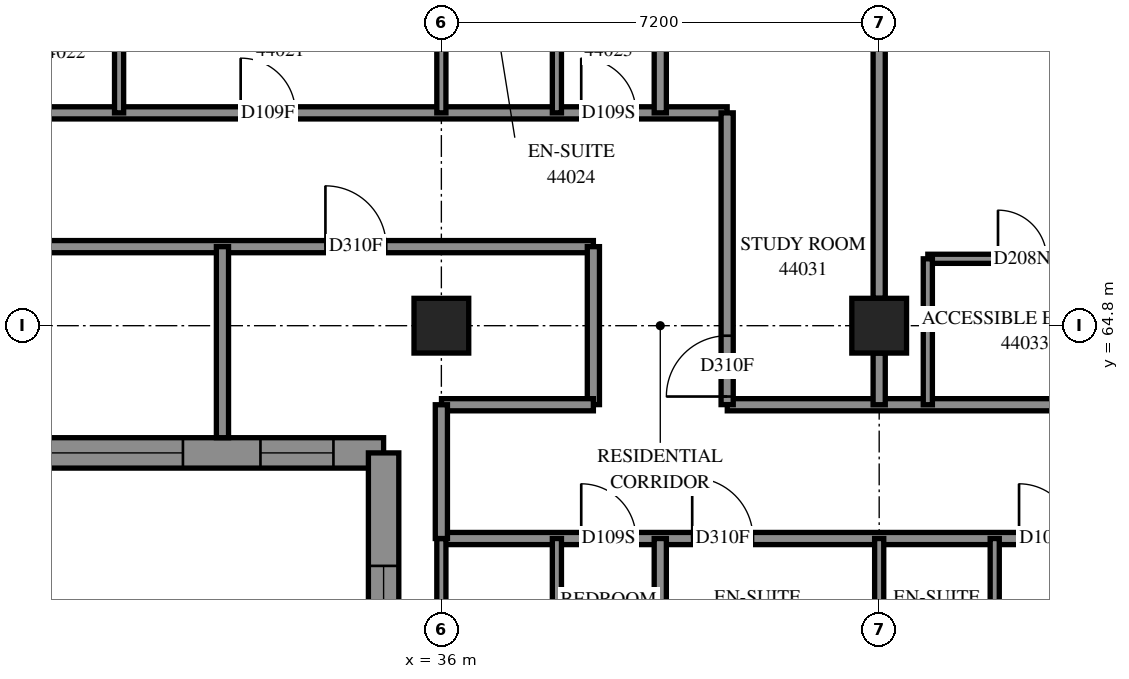
"""IFC4 building model, lengths in metres.
Left out: names, types, materials, properties, quantities, classifications, styles, units other than length and angle.
Written with IfcOpenShell. Run it as: python <this file> out.ifc"""

import sys

from ifc_helpers import new_model, si_unit, direction, frame, frame_2d, origin, origin_2d, place, context, subcontext, project, spatial, polyline, rectangle, outline, extrude, element, fill, save


model = new_model("IFC4")
c1 = context("Model", 3, precision=1e-05, world=origin(), true_north=direction((0.0, 1.0)))
c2 = subcontext(c1, "Body", "Model", "MODEL_VIEW")
j1 = project(units=[si_unit("LENGTHUNIT", "METRE"), si_unit("PLANEANGLEUNIT", "RADIAN")], contexts=[c1])
p1 = place(None, origin())
s1 = spatial("IfcSite", under=j1, at=p1, CompositionType="ELEMENT")
p2 = place(p1, origin())
s2 = spatial("IfcBuilding", under=s1, at=p2, CompositionType="ELEMENT")
p3 = place(p2, frame((0.0, 0.0, 162.6)))
s3 = spatial("IfcBuildingStorey", under=s2, at=p3, CompositionType="ELEMENT", Elevation=162.6)
for number, where, z_axis, x_axis in (
    (1, (36.0, 64.8, 0.0), (0.0, 0.0, 1.0), (1.0, 0.0, 0.0)),
    (2, (43.2, 64.8, 0.0), (0.0, 0.0, 1.0), (1.0, 0.0, 0.0)),
):
    element("IfcColumn", number, at=place(p3, frame(where, z_axis=z_axis, x_axis=x_axis)), inside=s3, PredefinedType="COLUMN", context=c2, shape_type="SweptSolid", body=[
        extrude(rectangle(XDim=0.9, YDim=0.9, at=origin_2d()), origin(), (0.0, 0.0, 1.0), 3.1),
    ])
p4 = place(p3, frame((19.508, 62.708, 0.0), z_axis=(0.0, 0.0, 1.0), x_axis=(1.0, 0.0, 0.0)))
e3 = element("IfcWall", 3, at=p4, inside=s3, PredefinedType="SOLIDWALL", context=c2, shape_type="SweptSolid", body=[
    extrude(outline(polyline([(-0.25, -0.25), (15.292, -0.25), (15.792, 0.25), (0.25, 0.25), (-0.25, -0.25)])), origin(), (0.0, 0.0, 1.0), 3.1),
])
p5 = place(p4, frame((2.492, 0.0, 0.45)))
e4 = element("IfcOpeningElement", 4, at=p5, cuts=e3, PredefinedType="OPENING", context=c2, shape_type="SweptSolid", body=[
    extrude(rectangle(XDim=2.8, YDim=2.5, at=frame_2d((1.4, 1.25))), frame((0.0, 0.26, 0.0), z_axis=(0.0, -1.0, 0.0), x_axis=(1.0, 0.0, 0.0)), (0.0, 0.0, 1.0), 0.52),
])
p6 = place(p4, frame((6.092, 0.0, 0.45)))
e5 = element("IfcOpeningElement", 5, at=p6, cuts=e3, PredefinedType="OPENING", context=c2, shape_type="SweptSolid", body=[
    extrude(rectangle(XDim=2.8, YDim=2.5, at=frame_2d((1.4, 1.25))), frame((0.0, 0.26, 0.0), z_axis=(0.0, -1.0, 0.0), x_axis=(1.0, 0.0, 0.0)), (0.0, 0.0, 1.0), 0.52),
])
p7 = place(p4, frame((9.442, 0.0, 0.45)))
e6 = element("IfcOpeningElement", 6, at=p7, cuts=e3, PredefinedType="OPENING", context=c2, shape_type="SweptSolid", body=[
    extrude(rectangle(XDim=2.8, YDim=2.5, at=frame_2d((1.4, 1.25))), frame((0.0, 0.26, 0.0), z_axis=(0.0, -1.0, 0.0), x_axis=(1.0, 0.0, 0.0)), (0.0, 0.0, 1.0), 0.52),
])
p8 = place(p4, frame((0.671, 0.0, 0.45)))
e7 = element("IfcOpeningElement", 7, at=p8, cuts=e3, PredefinedType="OPENING", context=c2, shape_type="SweptSolid", body=[
    extrude(rectangle(XDim=1.2, YDim=2.5, at=frame_2d((0.6, 1.25))), frame((0.0, 0.26, 0.0), z_axis=(0.0, -1.0, 0.0), x_axis=(1.0, 0.0, 0.0)), (0.0, 0.0, 1.0), 0.52),
])
p9 = place(p4, frame((13.517, 0.0, 0.45)))
e8 = element("IfcOpeningElement", 8, at=p9, cuts=e3, PredefinedType="OPENING", context=c2, shape_type="SweptSolid", body=[
    extrude(rectangle(XDim=1.2, YDim=2.5, at=frame_2d((0.6, 1.25))), frame((0.0, 0.26, 0.0), z_axis=(0.0, -1.0, 0.0), x_axis=(1.0, 0.0, 0.0)), (0.0, 0.0, 1.0), 0.52),
])
p10 = place(p3, frame((35.05, 62.708, 0.0), z_axis=(0.0, 0.0, 1.0), x_axis=(0.0, -1.0, 0.0)))
e9 = element("IfcWall", 9, at=p10, inside=s3, PredefinedType="SOLIDWALL", context=c2, shape_type="SweptSolid", body=[
    extrude(outline(polyline([(0.25, -0.25), (6.308, -0.25), (5.808, 0.25), (-0.25, 0.25), (0.25, -0.25)])), origin(), (0.0, 0.0, 1.0), 3.1),
])
p11 = place(p10, frame((1.858, 0.0, 0.7)))
e10 = element("IfcOpeningElement", 10, at=p11, cuts=e9, PredefinedType="OPENING", context=c2, shape_type="SweptSolid", body=[
    extrude(rectangle(XDim=1.8, YDim=2.2, at=frame_2d((0.9, 1.1))), frame((0.0, 0.26, 0.0), z_axis=(0.0, -1.0, 0.0), x_axis=(1.0, 0.0, 0.0)), (0.0, 0.0, 1.0), 0.52),
])
p12 = place(p10, frame((3.908, 0.0, 0.45)))
e11 = element("IfcOpeningElement", 11, at=p12, cuts=e9, PredefinedType="OPENING", context=c2, shape_type="SweptSolid", body=[
    extrude(rectangle(XDim=0.8, YDim=2.5, at=frame_2d((0.4, 1.25))), frame((0.0, 0.26, 0.0), z_axis=(0.0, -1.0, 0.0), x_axis=(1.0, 0.0, 0.0)), (0.0, 0.0, 1.0), 0.52),
])
p13 = place(p3, frame((21.6, 68.3, 0.0), z_axis=(0.0, 0.0, 1.0), x_axis=(1.0, 0.0, 0.0)))
e12 = element("IfcWall", 12, at=p13, inside=s3, PredefinedType="PARTITIONING", context=c2, shape_type="SweptSolid", body=[
    extrude(rectangle(XDim=19.1, YDim=0.2, at=frame_2d((9.55, 0.0))), origin(), (0.0, 0.0, 1.0), 3.1),
])
p14 = place(p13, frame((3.899, 0.0, 0.0)))
e13 = element("IfcOpeningElement", 13, at=p14, cuts=e12, PredefinedType="OPENING", context=c2, shape_type="SweptSolid", body=[
    extrude(rectangle(XDim=0.9, YDim=2.1, at=frame_2d((0.45, 1.05))), frame((0.0, 0.11, 0.0), z_axis=(0.0, -1.0, 0.0), x_axis=(1.0, 0.0, 0.0)), (0.0, 0.0, 1.0), 0.22),
])
p15 = place(p13, frame((11.099, 0.0, 0.0)))
e14 = element("IfcOpeningElement", 14, at=p15, cuts=e12, PredefinedType="OPENING", context=c2, shape_type="SweptSolid", body=[
    extrude(rectangle(XDim=0.9, YDim=2.1, at=frame_2d((0.45, 1.05))), frame((0.0, 0.11, 0.0), z_axis=(0.0, -1.0, 0.0), x_axis=(1.0, 0.0, 0.0)), (0.0, 0.0, 1.0), 0.22),
])
p16 = place(p13, frame((16.7, 0.0, 0.0)))
e15 = element("IfcOpeningElement", 15, at=p16, cuts=e12, PredefinedType="OPENING", context=c2, shape_type="SweptSolid", body=[
    extrude(rectangle(XDim=0.9, YDim=2.1, at=frame_2d((0.45, 1.05))), frame((0.0, 0.11, 0.0), z_axis=(0.0, -1.0, 0.0), x_axis=(1.0, 0.0, 0.0)), (0.0, 0.0, 1.0), 0.22),
])
p17 = place(p3, frame((21.6, 66.1, 0.0), z_axis=(0.0, 0.0, 1.0), x_axis=(1.0, 0.0, 0.0)))
e16 = element("IfcWall", 16, at=p17, inside=s3, PredefinedType="PARTITIONING", context=c2, shape_type="SweptSolid", body=[
    extrude(rectangle(XDim=16.9, YDim=0.2, at=frame_2d((8.45, 0.0))), origin(), (0.0, 0.0, 1.0), 3.1),
])
p18 = place(p17, frame((12.493, 0.0, 0.0)))
e17 = element("IfcOpeningElement", 17, at=p18, cuts=e16, PredefinedType="OPENING", context=c2, shape_type="SweptSolid", body=[
    extrude(rectangle(XDim=1.0, YDim=2.1, at=frame_2d((0.5, 1.05))), frame((0.0, 0.11, 0.0), z_axis=(0.0, -1.0, 0.0), x_axis=(1.0, 0.0, 0.0)), (0.0, 0.0, 1.0), 0.22),
])
p19 = place(p3, frame((36.0, 61.3, 0.0), z_axis=(0.0, 0.0, 1.0), x_axis=(1.0, 0.0, 0.0)))
e18 = element("IfcWall", 18, at=p19, inside=s3, PredefinedType="PARTITIONING", context=c2, shape_type="SweptSolid", body=[
    extrude(rectangle(XDim=16.9, YDim=0.2, at=frame_2d((8.45, 0.0))), origin(), (0.0, 0.0, 1.0), 3.1),
])
p20 = place(p19, frame((2.3, 0.0, 0.0)))
e19 = element("IfcOpeningElement", 19, at=p20, cuts=e18, PredefinedType="OPENING", context=c2, shape_type="SweptSolid", body=[
    extrude(rectangle(XDim=0.9, YDim=2.1, at=frame_2d((0.45, 1.05))), frame((0.0, 0.11, 0.0), z_axis=(0.0, -1.0, 0.0), x_axis=(1.0, 0.0, 0.0)), (0.0, 0.0, 1.0), 0.22),
])
p21 = place(p19, frame((4.125, 0.0, 0.0)))
e20 = element("IfcOpeningElement", 20, at=p21, cuts=e18, PredefinedType="OPENING", context=c2, shape_type="SweptSolid", body=[
    extrude(rectangle(XDim=1.0, YDim=2.1, at=frame_2d((0.5, 1.05))), frame((0.0, 0.11, 0.0), z_axis=(0.0, -1.0, 0.0), x_axis=(1.0, 0.0, 0.0)), (0.0, 0.0, 1.0), 0.22),
])
p22 = place(p19, frame((9.5, 0.0, 0.0)))
e21 = element("IfcOpeningElement", 21, at=p22, cuts=e18, PredefinedType="OPENING", context=c2, shape_type="SweptSolid", body=[
    extrude(rectangle(XDim=0.9, YDim=2.1, at=frame_2d((0.45, 1.05))), frame((0.0, 0.11, 0.0), z_axis=(0.0, -1.0, 0.0), x_axis=(1.0, 0.0, 0.0)), (0.0, 0.0, 1.0), 0.22),
])
p23 = place(p19, frame((11.325, 0.0, 0.0)))
e22 = element("IfcOpeningElement", 22, at=p23, cuts=e18, PredefinedType="OPENING", context=c2, shape_type="SweptSolid", body=[
    extrude(rectangle(XDim=1.0, YDim=2.1, at=frame_2d((0.5, 1.05))), frame((0.0, 0.11, 0.0), z_axis=(0.0, -1.0, 0.0), x_axis=(1.0, 0.0, 0.0)), (0.0, 0.0, 1.0), 0.22),
])
p24 = place(p19, frame((15.647, 0.0, 0.0)))
e23 = element("IfcOpeningElement", 23, at=p24, cuts=e18, PredefinedType="OPENING", context=c2, shape_type="SweptSolid", body=[
    extrude(rectangle(XDim=1.0, YDim=2.1, at=frame_2d((0.5, 1.05))), frame((0.0, 0.11, 0.0), z_axis=(0.0, -1.0, 0.0), x_axis=(1.0, 0.0, 0.0)), (0.0, 0.0, 1.0), 0.22),
])
p25 = place(p3, frame((40.702, 63.5, 0.0), z_axis=(0.0, 0.0, 1.0), x_axis=(1.0, 0.0, 0.0)))
e24 = element("IfcWall", 24, at=p25, inside=s3, PredefinedType="PARTITIONING", context=c2, shape_type="SweptSolid", body=[
    extrude(rectangle(XDim=14.198, YDim=0.2, at=frame_2d((7.099, 0.0))), origin(), (0.0, 0.0, 1.0), 3.1),
])
p26 = place(p25, frame((6.692, 0.0, 0.0)))
e25 = element("IfcOpeningElement", 25, at=p26, cuts=e24, PredefinedType="OPENING", context=c2, shape_type="SweptSolid", body=[
    extrude(rectangle(XDim=0.9, YDim=2.1, at=frame_2d((0.45, 1.05))), frame((0.0, 0.11, 0.0), z_axis=(0.0, -1.0, 0.0), x_axis=(1.0, 0.0, 0.0)), (0.0, 0.0, 1.0), 0.22),
])
p27 = place(p25, frame((10.25, 0.0, 0.0)))
e26 = element("IfcOpeningElement", 26, at=p27, cuts=e24, PredefinedType="OPENING", context=c2, shape_type="SweptSolid", body=[
    extrude(rectangle(XDim=0.9, YDim=2.1, at=frame_2d((0.45, 1.05))), frame((0.0, 0.11, 0.0), z_axis=(0.0, -1.0, 0.0), x_axis=(1.0, 0.0, 0.0)), (0.0, 0.0, 1.0), 0.22),
])
p28 = place(p3, frame((43.2, 65.25, 0.0), z_axis=(0.0, 0.0, 1.0), x_axis=(0.0, 1.0, 0.0)))
e27 = element("IfcWall", 27, at=p28, inside=s3, PredefinedType="PARTITIONING", context=c2, shape_type="SweptSolid", body=[
    extrude(rectangle(XDim=6.3, YDim=0.2, at=frame_2d((3.15, 0.0))), origin(), (0.0, 0.0, 1.0), 3.1),
])
p29 = place(p3, frame((40.7, 63.502, 0.0), z_axis=(0.0, 0.0, 1.0), x_axis=(0.0, 1.0, 0.0)))
e28 = element("IfcWall", 28, at=p29, inside=s3, PredefinedType="PARTITIONING", context=c2, shape_type="SweptSolid", body=[
    extrude(rectangle(XDim=4.798, YDim=0.2, at=frame_2d((2.399, 0.0))), origin(), (0.0, 0.0, 1.0), 3.1),
])
p30 = place(p29, frame((0.133, 0.0, 0.0)))
e29 = element("IfcOpeningElement", 29, at=p30, cuts=e28, PredefinedType="OPENING", context=c2, shape_type="SweptSolid", body=[
    extrude(rectangle(XDim=1.0, YDim=2.1, at=frame_2d((0.5, 1.05))), frame((0.0, 0.11, 0.0), z_axis=(0.0, -1.0, 0.0), x_axis=(1.0, 0.0, 0.0)), (0.0, 0.0, 1.0), 0.22),
])
p31 = place(p3, frame((39.6, 68.3, 0.0), z_axis=(0.0, 0.0, 1.0), x_axis=(0.0, 1.0, 0.0)))
e30 = element("IfcWall", 30, at=p31, inside=s3, PredefinedType="PARTITIONING", context=c2, shape_type="SweptSolid", body=[
    extrude(rectangle(XDim=4.581, YDim=0.2, at=frame_2d((2.291, 0.0))), origin(), (0.0, 0.0, 1.0), 3.1),
])
p32 = place(p3, frame((39.6, 56.9, 0.0), z_axis=(0.0, 0.0, 1.0), x_axis=(0.0, 1.0, 0.0)))
e31 = element("IfcWall", 31, at=p32, inside=s3, PredefinedType="PARTITIONING", context=c2, shape_type="SweptSolid", body=[
    extrude(rectangle(XDim=4.4, YDim=0.2, at=frame_2d((2.2, 0.0))), origin(), (0.0, 0.0, 1.0), 3.1),
])
p33 = place(p3, frame((44.0, 65.9, 0.0), z_axis=(0.0, 0.0, 1.0), x_axis=(1.0, 0.0, 0.0)))
e32 = element("IfcWall", 32, at=p33, inside=s3, PredefinedType="PARTITIONING", context=c2, shape_type="SweptSolid", body=[
    extrude(rectangle(XDim=3.2, YDim=0.15, at=frame_2d((1.6, 0.0))), origin(), (0.0, 0.0, 1.0), 3.1),
])
p34 = place(p33, frame((1.154, 0.0, 0.0)))
e33 = element("IfcOpeningElement", 33, at=p34, cuts=e32, PredefinedType="OPENING", context=c2, shape_type="SweptSolid", body=[
    extrude(rectangle(XDim=0.8, YDim=2.1, at=frame_2d((0.4, 1.05))), frame((0.0, 0.085, 0.0), z_axis=(0.0, -1.0, 0.0), x_axis=(1.0, 0.0, 0.0)), (0.0, 0.0, 1.0), 0.17),
])
p35 = place(p3, frame((32.4, 62.958, 0.0), z_axis=(0.0, 0.0, 1.0), x_axis=(0.0, 1.0, 0.0)))
e34 = element("IfcWall", 34, at=p35, inside=s3, PredefinedType="PARTITIONING", context=c2, shape_type="SweptSolid", body=[
    extrude(rectangle(XDim=3.142, YDim=0.2, at=frame_2d((1.571, 0.0))), origin(), (0.0, 0.0, 1.0), 3.1),
])
p36 = place(p3, frame((38.5, 63.502, 0.0), z_axis=(0.0, 0.0, 1.0), x_axis=(0.0, 1.0, 0.0)))
e35 = element("IfcWall", 35, at=p36, inside=s3, PredefinedType="PARTITIONING", context=c2, shape_type="SweptSolid", body=[
    extrude(rectangle(XDim=2.598, YDim=0.2, at=frame_2d((1.299, 0.0))), origin(), (0.0, 0.0, 1.0), 3.1),
])
p37 = place(p3, frame((36.002, 63.5, 0.0), z_axis=(0.0, 0.0, 1.0), x_axis=(1.0, 0.0, 0.0)))
e36 = element("IfcWall", 36, at=p37, inside=s3, PredefinedType="PARTITIONING", context=c2, shape_type="SweptSolid", body=[
    extrude(rectangle(XDim=2.498, YDim=0.2, at=frame_2d((1.249, 0.0))), origin(), (0.0, 0.0, 1.0), 3.1),
])
for number, where, z_axis, x_axis in (
    (37, (30.7, 68.3, 0.0), (0.0, 0.0, 1.0), (0.0, 1.0, 0.0)),
    (38, (37.9, 68.3, 0.0), (0.0, 0.0, 1.0), (0.0, 1.0, 0.0)),
    (39, (36.0, 68.3, 0.0), (0.0, 0.0, 1.0), (0.0, 1.0, 0.0)),
    (40, (44.0, 63.5, 0.0), (0.0, 0.0, 1.0), (0.0, 1.0, 0.0)),
    (41, (37.9, 58.9, 0.0), (0.0, 0.0, 1.0), (0.0, 1.0, 0.0)),
):
    element("IfcWall", number, at=place(p3, frame(where, z_axis=z_axis, x_axis=x_axis)), inside=s3, PredefinedType="PARTITIONING", context=c2, shape_type="SweptSolid", body=[
        extrude(rectangle(XDim=2.4, YDim=0.15, at=frame_2d((1.2, 0.0))), origin(), (0.0, 0.0, 1.0), 3.1),
    ])
p38 = place(p3, frame((36.0, 58.9, 0.0), z_axis=(0.0, 0.0, 1.0), x_axis=(0.0, 1.0, 0.0)))
e42 = element("IfcWall", 42, at=p38, inside=s3, PredefinedType="PARTITIONING", context=c2, shape_type="SweptSolid", body=[
    extrude(rectangle(XDim=2.4, YDim=0.15, at=frame_2d((1.2, 0.0))), origin(), (0.0, 0.0, 1.0), 2.6),
])
for number, where, z_axis, x_axis in (
    (43, (45.1, 58.9, 0.0), (0.0, 0.0, 1.0), (0.0, 1.0, 0.0)),
    (44, (43.2, 58.9, 0.0), (0.0, 0.0, 1.0), (0.0, 1.0, 0.0)),
):
    element("IfcWall", number, at=place(p3, frame(where, z_axis=z_axis, x_axis=x_axis)), inside=s3, PredefinedType="PARTITIONING", context=c2, shape_type="SweptSolid", body=[
        extrude(rectangle(XDim=2.4, YDim=0.15, at=frame_2d((1.2, 0.0))), origin(), (0.0, 0.0, 1.0), 3.1),
    ])
p39 = place(p3, frame((36.0, 61.3, 0.0), z_axis=(0.0, 0.0, 1.0), x_axis=(0.0, 1.0, 0.0)))
e45 = element("IfcWall", 45, at=p39, inside=s3, PredefinedType="PARTITIONING", context=c2, shape_type="SweptSolid", body=[
    extrude(rectangle(XDim=2.2, YDim=0.2, at=frame_2d((1.1, 0.0))), origin(), (0.0, 0.0, 1.0), 2.6),
])
p40 = place(p3, frame((43.2, 63.5, 0.0), z_axis=(0.0, 0.0, 1.0), x_axis=(0.0, 1.0, 0.0)))
e46 = element("IfcWall", 46, at=p40, inside=s3, PredefinedType="PARTITIONING", context=c2, shape_type="SweptSolid", body=[
    extrude(rectangle(XDim=0.85, YDim=0.2, at=frame_2d((0.425, 0.0))), origin(), (0.0, 0.0, 1.0), 3.1),
])
p41 = place(p7, origin())
e47 = element("IfcWindow", 47, at=p41, inside=s3, PartitioningType="SINGLE_PANEL", PredefinedType="WINDOW", context=c2, shape_type="SweptSolid", body=[
    extrude(rectangle(XDim=2.8, YDim=2.5, at=frame_2d((1.4, 1.25))), frame((0.0, 0.18, 0.0), z_axis=(0.0, -1.0, 0.0), x_axis=(1.0, 0.0, 0.0)), (0.0, 0.0, 1.0), 0.06),
])
fill(e6, e47)
p42 = place(p9, origin())
e48 = element("IfcWindow", 48, at=p42, inside=s3, PartitioningType="SINGLE_PANEL", PredefinedType="WINDOW", context=c2, shape_type="SweptSolid", body=[
    extrude(rectangle(XDim=1.2, YDim=2.5, at=frame_2d((0.6, 1.25))), frame((0.0, 0.18, 0.0), z_axis=(0.0, -1.0, 0.0), x_axis=(1.0, 0.0, 0.0)), (0.0, 0.0, 1.0), 0.06),
])
fill(e8, e48)
p43 = place(p15, origin())
e49 = element("IfcDoor", 49, at=p43, inside=s3, OperationType="SINGLE_SWING_RIGHT", PredefinedType="DOOR", context=c2, shape_type="SweptSolid", body=[
    extrude(rectangle(XDim=0.9, YDim=2.1, at=frame_2d((0.45, 1.05))), frame((0.0, 0.025, 0.0), z_axis=(0.0, -1.0, 0.0), x_axis=(1.0, 0.0, 0.0)), (0.0, 0.0, 1.0), 0.05),
])
fill(e14, e49)
p44 = place(p16, origin())
e50 = element("IfcDoor", 50, at=p44, inside=s3, OperationType="SINGLE_SWING_RIGHT", PredefinedType="DOOR", context=c2, shape_type="SweptSolid", body=[
    extrude(rectangle(XDim=0.9, YDim=2.1, at=frame_2d((0.45, 1.05))), frame((0.0, 0.025, 0.0), z_axis=(0.0, -1.0, 0.0), x_axis=(1.0, 0.0, 0.0)), (0.0, 0.0, 1.0), 0.05),
])
fill(e15, e50)
p45 = place(p18, origin())
e51 = element("IfcDoor", 51, at=p45, inside=s3, OperationType="SINGLE_SWING_RIGHT", PredefinedType="DOOR", context=c2, shape_type="SweptSolid", body=[
    extrude(rectangle(XDim=1.0, YDim=2.1, at=frame_2d((0.5, 1.05))), frame((0.0, 0.025, 0.0), z_axis=(0.0, -1.0, 0.0), x_axis=(1.0, 0.0, 0.0)), (0.0, 0.0, 1.0), 0.05),
])
fill(e17, e51)
p46 = place(p20, origin())
e52 = element("IfcDoor", 52, at=p46, inside=s3, OperationType="SINGLE_SWING_LEFT", PredefinedType="DOOR", context=c2, shape_type="SweptSolid", body=[
    extrude(rectangle(XDim=0.9, YDim=2.1, at=frame_2d((0.45, 1.05))), frame((0.0, 0.025, 0.0), z_axis=(0.0, -1.0, 0.0), x_axis=(1.0, 0.0, 0.0)), (0.0, 0.0, 1.0), 0.05),
])
fill(e19, e52)
p47 = place(p21, origin())
e53 = element("IfcDoor", 53, at=p47, inside=s3, OperationType="SINGLE_SWING_RIGHT", PredefinedType="DOOR", context=c2, shape_type="SweptSolid", body=[
    extrude(rectangle(XDim=1.0, YDim=2.1, at=frame_2d((0.5, 1.05))), frame((0.0, 0.025, 0.0), z_axis=(0.0, -1.0, 0.0), x_axis=(1.0, 0.0, 0.0)), (0.0, 0.0, 1.0), 0.05),
])
fill(e20, e53)
p48 = place(p22, origin())
e54 = element("IfcDoor", 54, at=p48, inside=s3, OperationType="SINGLE_SWING_LEFT", PredefinedType="DOOR", context=c2, shape_type="SweptSolid", body=[
    extrude(rectangle(XDim=0.9, YDim=2.1, at=frame_2d((0.45, 1.05))), frame((0.0, 0.025, 0.0), z_axis=(0.0, -1.0, 0.0), x_axis=(1.0, 0.0, 0.0)), (0.0, 0.0, 1.0), 0.05),
])
fill(e21, e54)
p49 = place(p30, origin())
e55 = element("IfcDoor", 55, at=p49, inside=s3, OperationType="SINGLE_SWING_LEFT", PredefinedType="DOOR", context=c2, shape_type="SweptSolid", body=[
    extrude(rectangle(XDim=1.0, YDim=2.1, at=frame_2d((0.5, 1.05))), frame((0.0, 0.025, 0.0), z_axis=(0.0, -1.0, 0.0), x_axis=(1.0, 0.0, 0.0)), (0.0, 0.0, 1.0), 0.05),
])
fill(e29, e55)
p50 = place(p34, origin())
e56 = element("IfcDoor", 56, at=p50, inside=s3, OperationType="SINGLE_SWING_RIGHT", PredefinedType="DOOR", context=c2, shape_type="SweptSolid", body=[
    extrude(rectangle(XDim=0.8, YDim=2.1, at=frame_2d((0.4, 1.05))), frame((0.0, 0.025, 0.0), z_axis=(0.0, -1.0, 0.0), x_axis=(1.0, 0.0, 0.0)), (0.0, 0.0, 1.0), 0.05),
])
fill(e33, e56)
p51 = place(p11, origin())
e57 = element("IfcWindow", 57, at=p51, inside=s3, PartitioningType="SINGLE_PANEL", PredefinedType="WINDOW", context=c2, shape_type="SweptSolid", body=[
    extrude(rectangle(XDim=1.8, YDim=2.2, at=frame_2d((0.9, 1.1))), frame((0.0, 0.18, 0.0), z_axis=(0.0, -1.0, 0.0), x_axis=(1.0, 0.0, 0.0)), (0.0, 0.0, 1.0), 0.06),
])
fill(e10, e57)
save(model, sys.argv[1])
